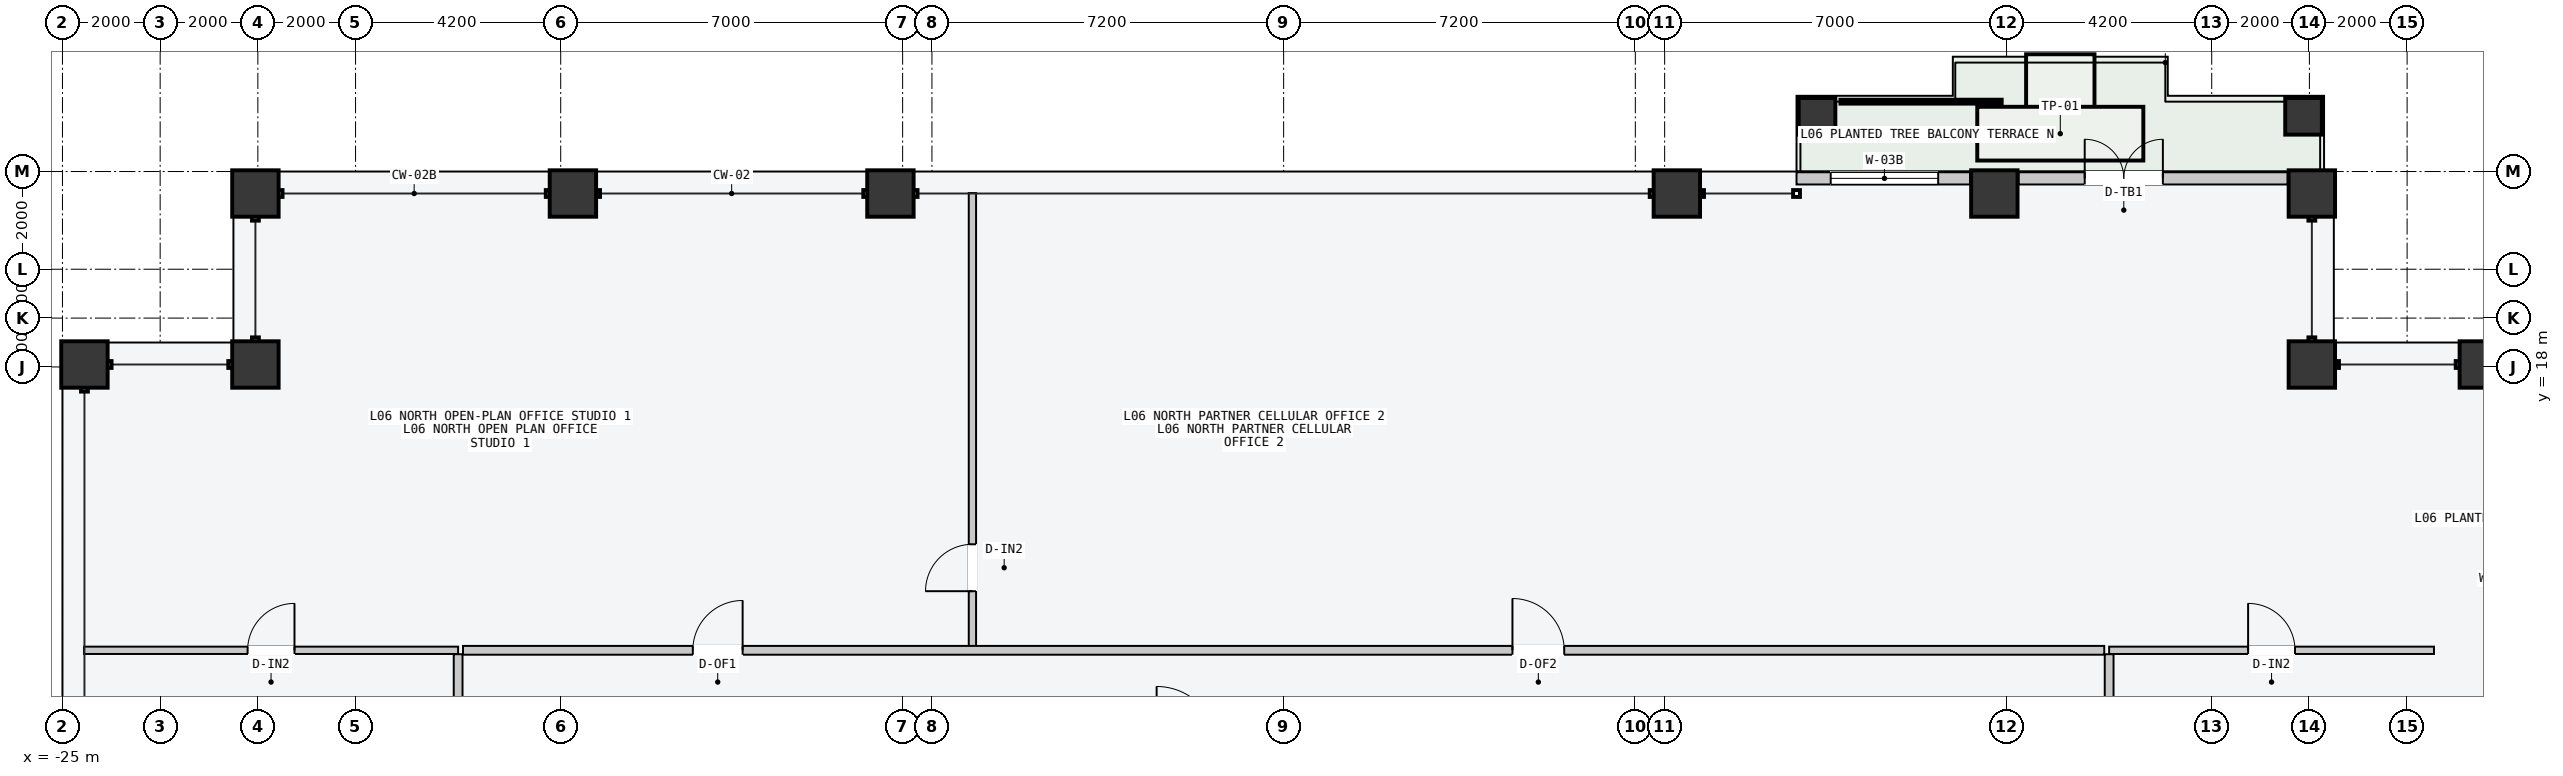
"""IFC4 building model, lengths in metres.
Left out: names, types, materials, properties, quantities, classifications, styles, units other than length and angle.
Written with IfcOpenShell. Run it as: python <this file> out.ifc"""

import sys

from ifc_helpers import new_model, si_unit, direction, frame, frame_2d, origin, origin_2d, place, context, subcontext, project, spatial, rectangle, hollow_rectangle, extrude, element, fill, save


model = new_model("IFC4")
c1 = context("Model", 3, precision=1e-05, world=origin(), true_north=direction((0.0, 1.0)))
c2 = subcontext(c1, "Body", "Model", "MODEL_VIEW")
j1 = project(units=[si_unit("LENGTHUNIT", "METRE"), si_unit("PLANEANGLEUNIT", "RADIAN")], contexts=[c1])
p1 = place(None, origin())
s1 = spatial("IfcSite", under=j1, at=p1, CompositionType="ELEMENT")
p2 = place(p1, origin())
s2 = spatial("IfcBuilding", under=s1, at=p2, CompositionType="ELEMENT")
p3 = place(p2, frame((0.0, 0.0, 27.6)))
s3 = spatial("IfcBuildingStorey", under=s2, at=p3, CompositionType="ELEMENT", Elevation=27.6)
for number, where, z_axis, x_axis in (
    (1, (-21.05, 21.55, 0.0), (0.0, 0.0, 1.0), (1.0, 0.0, 0.0)),
    (2, (-14.55, 21.55, 0.0), (0.0, 0.0, 1.0), (1.0, 0.0, 0.0)),
    (3, (-8.05, 21.55, 0.0), (0.0, 0.0, 1.0), (1.0, 0.0, 0.0)),
    (4, (8.05, 21.55, 0.0), (0.0, 0.0, 1.0), (1.0, 0.0, 0.0)),
    (5, (14.55, 21.55, 0.0), (0.0, 0.0, 1.0), (1.0, 0.0, 0.0)),
    (6, (21.05, 21.55, 0.0), (0.0, 0.0, 1.0), (1.0, 0.0, 0.0)),
    (7, (-24.55, 18.05, 0.0), (0.0, 0.0, 1.0), (0.0, 1.0, 0.0)),
    (8, (24.55, 18.05, 0.0), (0.0, 0.0, 1.0), (0.0, 1.0, 0.0)),
    (9, (-21.05, 18.05, 0.0), (0.0, 0.0, 1.0), (1.0, 0.0, 0.0)),
    (10, (21.05, 18.05, 0.0), (0.0, 0.0, 1.0), (1.0, 0.0, 0.0)),
):
    element("IfcColumn", number, at=place(p3, frame(where, z_axis=z_axis, x_axis=x_axis)), inside=s3, PredefinedType="COLUMN", context=c2, shape_type="SweptSolid", body=[
        extrude(hollow_rectangle(XDim=0.95, YDim=0.95, WallThickness=0.048, at=origin_2d()), origin(), (0.0, 0.0, 1.0), 3.6),
    ])
for number, where, z_axis, x_axis in (
    (11, (10.92, 23.13, -0.2), (0.0, 0.0, 1.0), (1.0, 0.0, 0.0)),
    (12, (20.88, 23.13, -0.2), (0.0, 0.0, 1.0), (1.0, 0.0, 0.0)),
):
    element("IfcColumn", number, at=place(p3, frame(where, z_axis=z_axis, x_axis=x_axis)), inside=s3, PredefinedType="COLUMN", context=c2, shape_type="SweptSolid", body=[
        extrude(hollow_rectangle(XDim=0.75, YDim=0.75, WallThickness=0.032, at=origin_2d()), origin(), (0.0, 0.0, 1.0), 3.8),
    ])
p4 = place(p3, frame((10.5, 21.86, 0.0), z_axis=(0.0, 0.0, 1.0), x_axis=(1.0, 0.0, 0.0)))
e13 = element("IfcWall", 13, at=p4, inside=s3, PredefinedType="STANDARD", context=c2, shape_type="SweptSolid", body=[
    extrude(rectangle(XDim=3.555, YDim=0.25, at=frame_2d((1.777, 0.0))), origin(), (0.0, 0.0, 1.0), 3.4),
])
p5 = place(p4, frame((0.7, 0.0, 0.85)))
e14 = element("IfcOpeningElement", 14, at=p5, cuts=e13, PredefinedType="OPENING", context=c2, shape_type="SweptSolid", body=[
    extrude(rectangle(XDim=2.2, YDim=2.1, at=frame_2d((1.1, 1.05))), frame((0.0, 0.135, 0.0), z_axis=(0.0, -1.0, 0.0), x_axis=(1.0, 0.0, 0.0)), (0.0, 0.0, 1.0), 0.27),
])
p6 = place(p3, frame((15.045, 21.86, 0.0), z_axis=(0.0, 0.0, 1.0), x_axis=(1.0, 0.0, 0.0)))
e15 = element("IfcWall", 15, at=p6, inside=s3, PredefinedType="STANDARD", context=c2, shape_type="SweptSolid", body=[
    extrude(rectangle(XDim=5.51, YDim=0.25, at=frame_2d((2.755, 0.0))), origin(), (0.0, 0.0, 1.0), 3.4),
])
p7 = place(p6, frame((1.355, 0.0, 0.0)))
e16 = element("IfcOpeningElement", 16, at=p7, cuts=e15, PredefinedType="OPENING", context=c2, shape_type="SweptSolid", body=[
    extrude(rectangle(XDim=1.6, YDim=2.2, at=frame_2d((0.8, 1.1))), frame((0.0, 0.135, 0.0), z_axis=(0.0, -1.0, 0.0), x_axis=(1.0, 0.0, 0.0)), (0.0, 0.0, 1.0), 0.27),
])
p8 = place(p3, frame((-6.371, 12.26, 0.0), z_axis=(0.0, 0.0, 1.0), x_axis=(0.0, 1.0, 0.0)))
e17 = element("IfcWall", 17, at=p8, inside=s3, PredefinedType="PARTITIONING", context=c2, shape_type="SweptSolid", body=[
    extrude(rectangle(XDim=9.3, YDim=0.15, at=frame_2d((4.65, 0.0))), origin(), (0.0, 0.0, 1.0), 3.4),
])
p9 = place(p8, frame((1.15, 0.0, 0.0)))
e18 = element("IfcOpeningElement", 18, at=p9, cuts=e17, PredefinedType="OPENING", context=c2, shape_type="SweptSolid", body=[
    extrude(rectangle(XDim=0.96, YDim=2.18, at=frame_2d((0.48, 1.09))), frame((0.0, 0.085, 0.0), z_axis=(0.0, -1.0, 0.0), x_axis=(1.0, 0.0, 0.0)), (0.0, 0.0, 1.0), 0.17),
])
p10 = place(p3, frame((-16.8, 12.2, 0.0), z_axis=(0.0, 0.0, 1.0), x_axis=(1.0, 0.0, 0.0)))
e19 = element("IfcWall", 19, at=p10, inside=s3, PredefinedType="PARTITIONING", context=c2, shape_type="SweptSolid", body=[
    extrude(rectangle(XDim=33.6, YDim=0.18, at=frame_2d((16.8, 0.0))), origin(), (0.0, 0.0, 1.0), 3.4),
])
p11 = place(p10, frame((4.704, 0.0, 0.0)))
e20 = element("IfcOpeningElement", 20, at=p11, cuts=e19, PredefinedType="OPENING", context=c2, shape_type="SweptSolid", body=[
    extrude(rectangle(XDim=1.02, YDim=2.2, at=frame_2d((0.51, 1.1))), frame((0.0, 0.1, 0.0), z_axis=(0.0, -1.0, 0.0), x_axis=(1.0, 0.0, 0.0)), (0.0, 0.0, 1.0), 0.2),
])
p12 = place(p10, frame((21.484, 0.0, 0.0)))
e21 = element("IfcOpeningElement", 21, at=p12, cuts=e19, PredefinedType="OPENING", context=c2, shape_type="SweptSolid", body=[
    extrude(rectangle(XDim=1.06, YDim=2.2, at=frame_2d((0.53, 1.1))), frame((0.0, 0.1, 0.0), z_axis=(0.0, -1.0, 0.0), x_axis=(1.0, 0.0, 0.0)), (0.0, 0.0, 1.0), 0.2),
])
p13 = place(p3, frame((-24.56, 12.2, 0.0), z_axis=(0.0, 0.0, 1.0), x_axis=(1.0, 0.0, 0.0)))
e22 = element("IfcWall", 22, at=p13, inside=s3, PredefinedType="PARTITIONING", context=c2, shape_type="SweptSolid", body=[
    extrude(rectangle(XDim=7.66, YDim=0.15, at=frame_2d((3.83, 0.0))), origin(), (0.0, 0.0, 1.0), 3.4),
])
p14 = place(p13, frame((3.35, 0.0, 0.0)))
e23 = element("IfcOpeningElement", 23, at=p14, cuts=e22, PredefinedType="OPENING", context=c2, shape_type="SweptSolid", body=[
    extrude(rectangle(XDim=0.96, YDim=2.18, at=frame_2d((0.48, 1.09))), frame((0.0, 0.085, 0.0), z_axis=(0.0, -1.0, 0.0), x_axis=(1.0, 0.0, 0.0)), (0.0, 0.0, 1.0), 0.17),
])
p15 = place(p3, frame((16.9, 12.2, 0.0), z_axis=(0.0, 0.0, 1.0), x_axis=(1.0, 0.0, 0.0)))
e24 = element("IfcWall", 24, at=p15, inside=s3, PredefinedType="PARTITIONING", context=c2, shape_type="SweptSolid", body=[
    extrude(rectangle(XDim=6.65, YDim=0.15, at=frame_2d((3.325, 0.0))), origin(), (0.0, 0.0, 1.0), 3.4),
])
p16 = place(p15, frame((2.845, 0.0, 0.0)))
e25 = element("IfcOpeningElement", 25, at=p16, cuts=e24, PredefinedType="OPENING", context=c2, shape_type="SweptSolid", body=[
    extrude(rectangle(XDim=0.96, YDim=2.18, at=frame_2d((0.48, 1.09))), frame((0.0, 0.085, 0.0), z_axis=(0.0, -1.0, 0.0), x_axis=(1.0, 0.0, 0.0)), (0.0, 0.0, 1.0), 0.17),
])
p17 = place(p3, frame((-16.9, -12.12, 0.0), z_axis=(0.0, 0.0, 1.0), x_axis=(0.0, 1.0, 0.0)))
e26 = element("IfcWall", 26, at=p17, inside=s3, PredefinedType="PARTITIONING", context=c2, shape_type="SweptSolid", body=[
    extrude(rectangle(XDim=24.24, YDim=0.18, at=frame_2d((12.12, 0.0))), origin(), (0.0, 0.0, 1.0), 3.4),
])
p18 = place(p17, frame((11.59, 0.0, 0.0)))
e27 = element("IfcOpeningElement", 27, at=p18, cuts=e26, PredefinedType="OPENING", context=c2, shape_type="SweptSolid", body=[
    extrude(rectangle(XDim=1.06, YDim=2.2, at=frame_2d((0.53, 1.1))), frame((0.0, 0.1, 0.0), z_axis=(0.0, -1.0, 0.0), x_axis=(1.0, 0.0, 0.0)), (0.0, 0.0, 1.0), 0.2),
])
p19 = place(p3, frame((16.9, -12.12, 0.0), z_axis=(0.0, 0.0, 1.0), x_axis=(0.0, 1.0, 0.0)))
e28 = element("IfcWall", 28, at=p19, inside=s3, PredefinedType="PARTITIONING", context=c2, shape_type="SweptSolid", body=[
    extrude(rectangle(XDim=24.24, YDim=0.18, at=frame_2d((12.12, 0.0))), origin(), (0.0, 0.0, 1.0), 3.4),
])
p20 = place(p19, frame((3.591, 0.0, 0.0)))
e29 = element("IfcOpeningElement", 29, at=p20, cuts=e28, PredefinedType="OPENING", context=c2, shape_type="SweptSolid", body=[
    extrude(rectangle(XDim=1.06, YDim=2.2, at=frame_2d((0.53, 1.1))), frame((0.0, 0.1, 0.0), z_axis=(0.0, -1.0, 0.0), x_axis=(1.0, 0.0, 0.0)), (0.0, 0.0, 1.0), 0.2),
])
p21 = place(p19, frame((15.621, 0.0, 0.0)))
e30 = element("IfcOpeningElement", 30, at=p21, cuts=e28, PredefinedType="OPENING", context=c2, shape_type="SweptSolid", body=[
    extrude(rectangle(XDim=1.24, YDim=2.24, at=frame_2d((0.62, 1.12))), frame((0.0, 0.1, 0.0), z_axis=(0.0, -1.0, 0.0), x_axis=(1.0, 0.0, 0.0)), (0.0, 0.0, 1.0), 0.2),
])
p22 = place(p5, origin())
e31 = element("IfcWindow", 31, at=p22, inside=s3, PartitioningType="SINGLE_PANEL", PredefinedType="WINDOW", context=c2, shape_type="SweptSolid", body=[
    extrude(rectangle(XDim=2.2, YDim=2.1, at=frame_2d((1.1, 1.05))), frame((0.0, 0.03, 0.0), z_axis=(0.0, -1.0, 0.0), x_axis=(1.0, 0.0, 0.0)), (0.0, 0.0, 1.0), 0.06),
])
fill(e14, e31)
p23 = place(p7, origin())
e32 = element("IfcDoor", 32, at=p23, inside=s3, OperationType="DOUBLE_DOOR_SINGLE_SWING", PredefinedType="DOOR", context=c2, shape_type="SweptSolid", body=[
    extrude(rectangle(XDim=1.6, YDim=2.2, at=frame_2d((0.8, 1.1))), frame((0.0, 0.025, 0.0), z_axis=(0.0, -1.0, 0.0), x_axis=(1.0, 0.0, 0.0)), (0.0, 0.0, 1.0), 0.05),
])
fill(e16, e32)
p24 = place(p9, origin())
e33 = element("IfcDoor", 33, at=p24, inside=s3, OperationType="SINGLE_SWING_LEFT", PredefinedType="DOOR", context=c2, shape_type="SweptSolid", body=[
    extrude(rectangle(XDim=0.96, YDim=2.18, at=frame_2d((0.48, 1.09))), frame((0.0, 0.025, 0.0), z_axis=(0.0, -1.0, 0.0), x_axis=(1.0, 0.0, 0.0)), (0.0, 0.0, 1.0), 0.05),
])
fill(e18, e33)
p25 = place(p11, origin())
e34 = element("IfcDoor", 34, at=p25, inside=s3, OperationType="SINGLE_SWING_RIGHT", PredefinedType="DOOR", context=c2, shape_type="SweptSolid", body=[
    extrude(rectangle(XDim=1.02, YDim=2.2, at=frame_2d((0.51, 1.1))), frame((0.0, 0.025, 0.0), z_axis=(0.0, -1.0, 0.0), x_axis=(1.0, 0.0, 0.0)), (0.0, 0.0, 1.0), 0.05),
])
fill(e20, e34)
p26 = place(p12, origin())
e35 = element("IfcDoor", 35, at=p26, inside=s3, OperationType="SINGLE_SWING_LEFT", PredefinedType="DOOR", context=c2, shape_type="SweptSolid", body=[
    extrude(rectangle(XDim=1.06, YDim=2.2, at=frame_2d((0.53, 1.1))), frame((0.0, 0.025, 0.0), z_axis=(0.0, -1.0, 0.0), x_axis=(1.0, 0.0, 0.0)), (0.0, 0.0, 1.0), 0.05),
])
fill(e21, e35)
p27 = place(p14, origin())
e36 = element("IfcDoor", 36, at=p27, inside=s3, OperationType="SINGLE_SWING_RIGHT", PredefinedType="DOOR", context=c2, shape_type="SweptSolid", body=[
    extrude(rectangle(XDim=0.96, YDim=2.18, at=frame_2d((0.48, 1.09))), frame((0.0, 0.025, 0.0), z_axis=(0.0, -1.0, 0.0), x_axis=(1.0, 0.0, 0.0)), (0.0, 0.0, 1.0), 0.05),
])
fill(e23, e36)
p28 = place(p16, origin())
e37 = element("IfcDoor", 37, at=p28, inside=s3, OperationType="SINGLE_SWING_LEFT", PredefinedType="DOOR", context=c2, shape_type="SweptSolid", body=[
    extrude(rectangle(XDim=0.96, YDim=2.18, at=frame_2d((0.48, 1.09))), frame((0.0, 0.025, 0.0), z_axis=(0.0, -1.0, 0.0), x_axis=(1.0, 0.0, 0.0)), (0.0, 0.0, 1.0), 0.05),
])
fill(e25, e37)
save(model, sys.argv[1])
